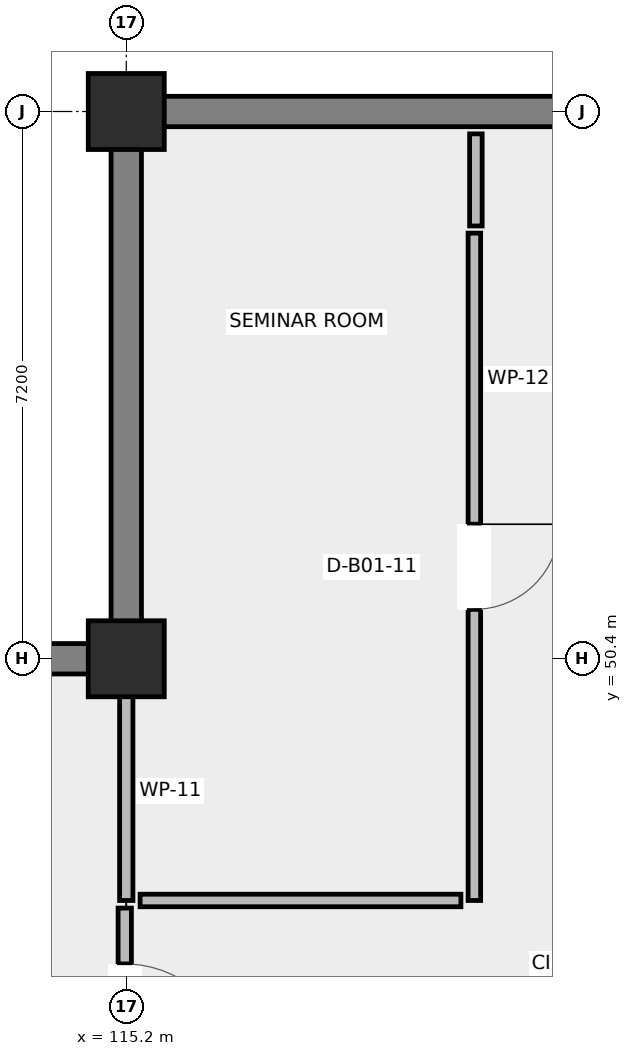
"""IFC4 building model, lengths in metres.
Left out: names, types, materials, properties, quantities, classifications, styles, units other than length and angle.
Written with IfcOpenShell. Run it as: python <this file> out.ifc"""

import sys

from ifc_helpers import new_model, si_unit, direction, frame, frame_2d, origin, origin_2d, place, context, subcontext, project, spatial, rectangle, extrude, element, fill, save


model = new_model("IFC4")
c1 = context("Model", 3, precision=1e-05, world=origin(), true_north=direction((0.0, 1.0)))
c2 = subcontext(c1, "Body", "Model", "MODEL_VIEW")
j1 = project(units=[si_unit("LENGTHUNIT", "METRE"), si_unit("PLANEANGLEUNIT", "RADIAN")], contexts=[c1])
p1 = place(None, origin())
s1 = spatial("IfcSite", under=j1, at=p1, CompositionType="ELEMENT")
p2 = place(p1, origin())
s2 = spatial("IfcBuilding", under=s1, at=p2, CompositionType="ELEMENT")
p3 = place(p2, frame((0.0, 0.0, -4.5)))
s3 = spatial("IfcBuildingStorey", under=s2, at=p3, CompositionType="ELEMENT", Elevation=-4.5)
for number, where, z_axis, x_axis in (
    (1, (115.2, 50.4, 0.0), (0.0, 0.0, 1.0), (1.0, 0.0, 0.0)),
    (2, (115.2, 57.6, 0.0), (0.0, 0.0, 1.0), (1.0, 0.0, 0.0)),
):
    element("IfcColumn", number, at=place(p3, frame(where, z_axis=z_axis, x_axis=x_axis)), inside=s3, PredefinedType="COLUMN", context=c2, shape_type="SweptSolid", body=[
        extrude(rectangle(XDim=1.0, YDim=1.0, at=origin_2d()), origin(), (0.0, 0.0, 1.0), 4.15),
    ])
p4 = place(p3, frame((57.6, 50.4, 0.0), z_axis=(0.0, 0.0, 1.0), x_axis=(1.0, 0.0, 0.0)))
e3 = element("IfcWall", 3, at=p4, inside=s3, PredefinedType="SOLIDWALL", context=c2, shape_type="SweptSolid", body=[
    extrude(rectangle(XDim=57.6, YDim=0.4, at=frame_2d((28.8, 0.0))), origin(), (0.0, 0.0, 1.0), 4.15),
])
p5 = place(p3, frame((115.2, 50.4, 0.0), z_axis=(0.0, 0.0, 1.0), x_axis=(0.0, 1.0, 0.0)))
e4 = element("IfcWall", 4, at=p5, inside=s3, PredefinedType="SOLIDWALL", context=c2, shape_type="SweptSolid", body=[
    extrude(rectangle(XDim=7.2, YDim=0.4, at=frame_2d((3.6, 0.0))), origin(), (0.0, 0.0, 1.0), 4.15),
])
p6 = place(p3, frame((115.2, 57.6, 0.0), z_axis=(0.0, 0.0, 1.0), x_axis=(1.0, 0.0, 0.0)))
e5 = element("IfcWall", 5, at=p6, inside=s3, PredefinedType="SOLIDWALL", context=c2, shape_type="SweptSolid", body=[
    extrude(rectangle(XDim=50.4, YDim=0.4, at=frame_2d((25.2, 0.0))), origin(), (0.0, 0.0, 1.0), 4.15),
])
p7 = place(p3, frame((115.2, 50.1, 0.0), z_axis=(0.0, 0.0, 1.0), x_axis=(0.0, -1.0, 0.0)))
e6 = element("IfcWall", 6, at=p7, inside=s3, PredefinedType="PARTITIONING", context=c2, shape_type="SweptSolid", body=[
    extrude(rectangle(XDim=2.88, YDim=0.175, at=frame_2d((1.44, 0.0))), origin(), (0.0, 0.0, 1.0), 3.19),
])
p8 = place(p3, frame((115.18, 47.12, 0.0), z_axis=(0.0, 0.0, 1.0), x_axis=(0.0, -1.0, 0.0)))
e7 = element("IfcWall", 7, at=p8, inside=s3, PredefinedType="PARTITIONING", context=c2, shape_type="SweptSolid", body=[
    extrude(rectangle(XDim=2.92, YDim=0.175, at=frame_2d((1.46, 0.0))), origin(), (0.0, 0.0, 1.0), 3.19),
])
p9 = place(p8, frame((0.735, 0.0, 0.0)))
e8 = element("IfcOpeningElement", 8, at=p9, cuts=e7, PredefinedType="OPENING", context=c2, shape_type="SweptSolid", body=[
    extrude(rectangle(XDim=1.45, YDim=2.2, at=frame_2d((0.725, 1.1))), frame((0.0, 0.097, 0.0), z_axis=(0.0, -1.0, 0.0), x_axis=(1.0, 0.0, 0.0)), (0.0, 0.0, 1.0), 0.195),
])
p10 = place(p3, frame((119.78, 56.0, 0.0), z_axis=(0.0, 0.0, 1.0), x_axis=(0.0, -1.0, 0.0)))
e9 = element("IfcWall", 9, at=p10, inside=s3, PredefinedType="PARTITIONING", context=c2, shape_type="SweptSolid", body=[
    extrude(rectangle(XDim=8.78, YDim=0.165, at=frame_2d((4.39, 0.0))), origin(), (0.0, 0.0, 1.0), 3.19),
])
p11 = place(p10, frame((3.83, 0.0, 0.0)))
e10 = element("IfcOpeningElement", 10, at=p11, cuts=e9, PredefinedType="OPENING", context=c2, shape_type="SweptSolid", body=[
    extrude(rectangle(XDim=1.12, YDim=2.15, at=frame_2d((0.56, 1.075))), frame((0.0, 0.093, 0.0), z_axis=(0.0, -1.0, 0.0), x_axis=(1.0, 0.0, 0.0)), (0.0, 0.0, 1.0), 0.185),
])
p12 = place(p3, frame((119.603, 47.22, 0.0), z_axis=(0.0, 0.0, 1.0), x_axis=(-1.0, 0.0, 0.0)))
e11 = element("IfcWall", 11, at=p12, inside=s3, PredefinedType="PARTITIONING", context=c2, shape_type="SweptSolid", body=[
    extrude(rectangle(XDim=4.221, YDim=0.165, at=frame_2d((2.11, 0.0))), origin(), (0.0, 0.0, 1.0), 3.19),
])
p13 = place(p3, frame((119.8, 57.306, 0.0), z_axis=(0.0, 0.0, 1.0), x_axis=(0.0, -1.0, 0.0)))
e12 = element("IfcWall", 12, at=p13, inside=s3, PredefinedType="PARTITIONING", context=c2, shape_type="SweptSolid", body=[
    extrude(rectangle(XDim=1.212, YDim=0.165, at=frame_2d((0.606, 0.0))), origin(), (0.0, 0.0, 1.0), 3.19),
])
p14 = place(p9, origin())
e13 = element("IfcDoor", 13, at=p14, inside=s3, OperationType="SINGLE_SWING_RIGHT", PredefinedType="DOOR", context=c2, shape_type="SweptSolid", body=[
    extrude(rectangle(XDim=1.45, YDim=2.2, at=frame_2d((0.725, 1.1))), frame((0.0, 0.025, 0.0), z_axis=(0.0, -1.0, 0.0), x_axis=(1.0, 0.0, 0.0)), (0.0, 0.0, 1.0), 0.05),
])
fill(e8, e13)
p15 = place(p11, origin())
e14 = element("IfcDoor", 14, at=p15, inside=s3, OperationType="SINGLE_SWING_LEFT", PredefinedType="DOOR", context=c2, shape_type="SweptSolid", body=[
    extrude(rectangle(XDim=1.12, YDim=2.15, at=frame_2d((0.56, 1.075))), frame((0.0, 0.025, 0.0), z_axis=(0.0, -1.0, 0.0), x_axis=(1.0, 0.0, 0.0)), (0.0, 0.0, 1.0), 0.05),
])
fill(e10, e14)
save(model, sys.argv[1])
